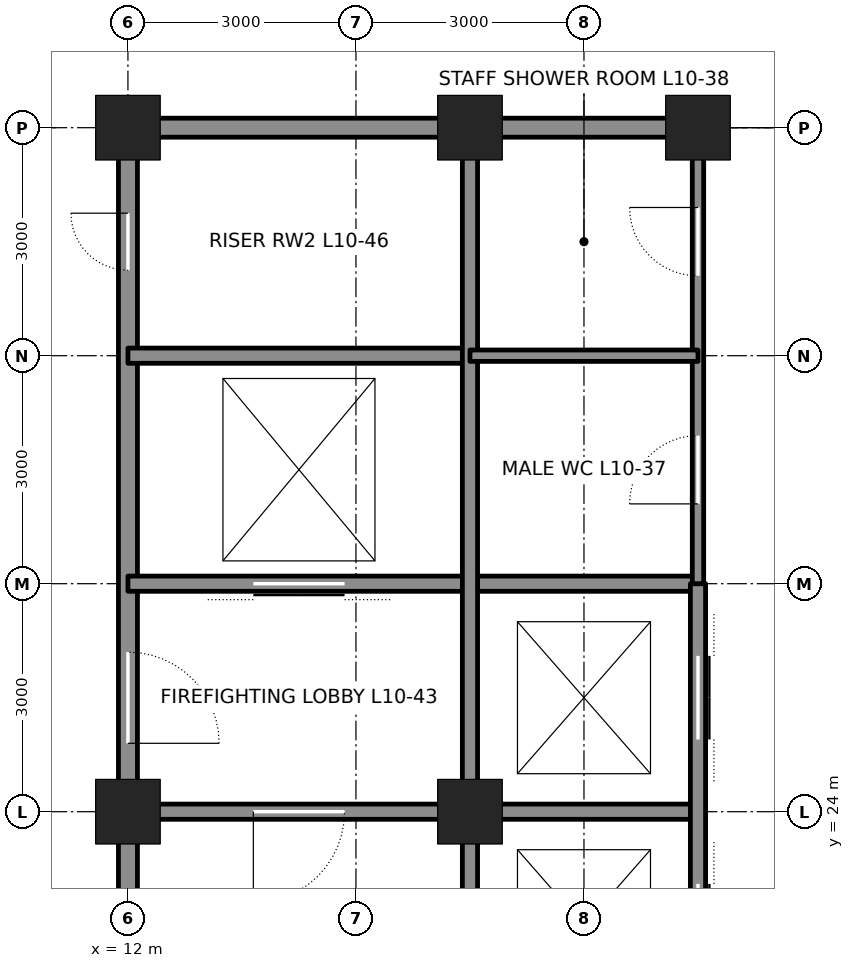
"""IFC4 building model, lengths in metres.
Left out: names, types, materials, properties, quantities, classifications, styles, units other than length and angle.
Written with IfcOpenShell. Run it as: python <this file> out.ifc"""

import sys

from ifc_helpers import new_model, si_unit, direction, frame, frame_2d, origin, origin_2d, place, context, subcontext, project, spatial, rectangle, hollow_rectangle, extrude, element, fill, save


model = new_model("IFC4")
c1 = context("Model", 3, precision=1e-05, world=origin(), true_north=direction((0.0, 1.0)))
c2 = subcontext(c1, "Body", "Model", "MODEL_VIEW")
j1 = project(units=[si_unit("LENGTHUNIT", "METRE"), si_unit("PLANEANGLEUNIT", "RADIAN")], contexts=[c1])
p1 = place(None, origin())
s1 = spatial("IfcSite", under=j1, at=p1, CompositionType="ELEMENT")
p2 = place(p1, origin())
s2 = spatial("IfcBuilding", under=s1, at=p2, CompositionType="ELEMENT")
p3 = place(p2, frame((0.0, 0.0, 51.3)))
s3 = spatial("IfcBuildingStorey", under=s2, at=p3, CompositionType="ELEMENT", Elevation=51.3)
for number, where, z_axis, x_axis in (
    (1, (12.0, 33.0, 0.0), (0.0, 0.0, 1.0), (1.0, 0.0, 0.0)),
    (2, (16.5, 33.0, 0.0), (0.0, 0.0, 1.0), (1.0, 0.0, 0.0)),
    (3, (19.5, 33.0, 0.0), (0.0, 0.0, 1.0), (1.0, 0.0, 0.0)),
    (4, (12.0, 24.0, 0.0), (0.0, 0.0, 1.0), (1.0, 0.0, 0.0)),
    (5, (16.5, 24.0, 0.0), (0.0, 0.0, 1.0), (1.0, 0.0, 0.0)),
):
    element("IfcColumn", number, at=place(p3, frame(where, z_axis=z_axis, x_axis=x_axis)), inside=s3, PredefinedType="COLUMN", context=c2, shape_type="SweptSolid", body=[
        extrude(hollow_rectangle(XDim=0.85, YDim=0.85, WallThickness=0.085, at=origin_2d()), origin(), (0.0, 0.0, 1.0), 4.5),
    ])
p4 = place(p3, frame((12.0, 21.25, 0.0), z_axis=(0.0, 0.0, 1.0), x_axis=(0.0, 1.0, 0.0)))
e6 = element("IfcWall", 6, at=p4, inside=s3, PredefinedType="SOLIDWALL", context=c2, shape_type="SweptSolid", body=[
    extrude(rectangle(XDim=2.5, YDim=0.25, at=frame_2d((1.25, 0.0))), origin(), (0.0, 0.0, 1.0), 3.113),
])
p5 = place(p3, frame((12.0, 24.25, 0.0), z_axis=(0.0, 0.0, 1.0), x_axis=(0.0, 1.0, 0.0)))
e7 = element("IfcWall", 7, at=p5, inside=s3, PredefinedType="SOLIDWALL", context=c2, shape_type="SweptSolid", body=[
    extrude(rectangle(XDim=8.5, YDim=0.25, at=frame_2d((4.25, 0.0))), origin(), (0.0, 0.0, 1.0), 3.113),
])
p6 = place(p5, frame((0.65, 0.0, 0.0)))
e8 = element("IfcOpeningElement", 8, at=p6, cuts=e7, PredefinedType="OPENING", context=c2, shape_type="SweptSolid", body=[
    extrude(rectangle(XDim=1.2, YDim=2.1, at=frame_2d((0.6, 1.05))), frame((0.0, 0.135, 0.0), z_axis=(0.0, -1.0, 0.0), x_axis=(1.0, 0.0, 0.0)), (0.0, 0.0, 1.0), 0.27),
])
p7 = place(p5, frame((6.875, 0.0, 0.0)))
e9 = element("IfcOpeningElement", 9, at=p7, cuts=e7, PredefinedType="OPENING", context=c2, shape_type="SweptSolid", body=[
    extrude(rectangle(XDim=0.75, YDim=2.1, at=frame_2d((0.375, 1.05))), frame((0.0, 0.135, 0.0), z_axis=(0.0, -1.0, 0.0), x_axis=(1.0, 0.0, 0.0)), (0.0, 0.0, 1.0), 0.27),
])
p8 = place(p3, frame((12.25, 24.0, 0.0), z_axis=(0.0, 0.0, 1.0), x_axis=(1.0, 0.0, 0.0)))
e10 = element("IfcWall", 10, at=p8, inside=s3, PredefinedType="SOLIDWALL", context=c2, shape_type="SweptSolid", body=[
    extrude(rectangle(XDim=4.0, YDim=0.2, at=frame_2d((2.0, 0.0))), origin(), (0.0, 0.0, 1.0), 3.39),
])
p9 = place(p8, frame((1.4, 0.0, 0.0)))
e11 = element("IfcOpeningElement", 11, at=p9, cuts=e10, PredefinedType="OPENING", context=c2, shape_type="SweptSolid", body=[
    extrude(rectangle(XDim=1.2, YDim=2.1, at=frame_2d((0.6, 1.05))), frame((0.0, 0.11, 0.0), z_axis=(0.0, -1.0, 0.0), x_axis=(1.0, 0.0, 0.0)), (0.0, 0.0, 1.0), 0.22),
])
p10 = place(p3, frame((16.75, 24.0, 0.0), z_axis=(0.0, 0.0, 1.0), x_axis=(1.0, 0.0, 0.0)))
e12 = element("IfcWall", 12, at=p10, inside=s3, PredefinedType="SOLIDWALL", context=c2, shape_type="SweptSolid", body=[
    extrude(rectangle(XDim=2.75, YDim=0.2, at=frame_2d((1.375, 0.0))), origin(), (0.0, 0.0, 1.0), 3.39),
])
p11 = place(p3, frame((12.0, 27.0, 0.0), z_axis=(0.0, 0.0, 1.0), x_axis=(1.0, 0.0, 0.0)))
e13 = element("IfcWall", 13, at=p11, inside=s3, PredefinedType="SOLIDWALL", context=c2, shape_type="SweptSolid", body=[
    extrude(rectangle(XDim=7.5, YDim=0.2, at=frame_2d((3.75, 0.0))), origin(), (0.0, 0.0, 1.0), 4.34),
])
p12 = place(p11, frame((1.65, 0.0, 0.0)))
e14 = element("IfcOpeningElement", 14, at=p12, cuts=e13, PredefinedType="OPENING", context=c2, shape_type="SweptSolid", body=[
    extrude(rectangle(XDim=1.2, YDim=2.1, at=frame_2d((0.6, 1.05))), frame((0.0, 0.11, 0.0), z_axis=(0.0, -1.0, 0.0), x_axis=(1.0, 0.0, 0.0)), (0.0, 0.0, 1.0), 0.22),
])
p13 = place(p3, frame((12.0, 30.0, 0.0), z_axis=(0.0, 0.0, 1.0), x_axis=(1.0, 0.0, 0.0)))
e15 = element("IfcWall", 15, at=p13, inside=s3, PredefinedType="SOLIDWALL", context=c2, shape_type="SweptSolid", body=[
    extrude(rectangle(XDim=4.5, YDim=0.2, at=frame_2d((2.25, 0.0))), origin(), (0.0, 0.0, 1.0), 4.34),
])
p14 = place(p3, frame((12.25, 33.0, 0.0), z_axis=(0.0, 0.0, 1.0), x_axis=(1.0, 0.0, 0.0)))
e16 = element("IfcWall", 16, at=p14, inside=s3, PredefinedType="SOLIDWALL", context=c2, shape_type="SweptSolid", body=[
    extrude(rectangle(XDim=4.0, YDim=0.25, at=frame_2d((2.0, 0.0))), origin(), (0.0, 0.0, 1.0), 3.181),
])
p15 = place(p3, frame((16.75, 33.0, 0.0), z_axis=(0.0, 0.0, 1.0), x_axis=(1.0, 0.0, 0.0)))
e17 = element("IfcWall", 17, at=p15, inside=s3, PredefinedType="SOLIDWALL", context=c2, shape_type="SweptSolid", body=[
    extrude(rectangle(XDim=2.5, YDim=0.25, at=frame_2d((1.25, 0.0))), origin(), (0.0, 0.0, 1.0), 3.181),
])
p16 = place(p3, frame((16.5, 21.25, 0.0), z_axis=(0.0, 0.0, 1.0), x_axis=(0.0, 1.0, 0.0)))
e18 = element("IfcWall", 18, at=p16, inside=s3, PredefinedType="SOLIDWALL", context=c2, shape_type="SweptSolid", body=[
    extrude(rectangle(XDim=2.5, YDim=0.2, at=frame_2d((1.25, 0.0))), origin(), (0.0, 0.0, 1.0), 3.413),
])
p17 = place(p3, frame((16.5, 24.25, 0.0), z_axis=(0.0, 0.0, 1.0), x_axis=(0.0, 1.0, 0.0)))
e19 = element("IfcWall", 19, at=p17, inside=s3, PredefinedType="SOLIDWALL", context=c2, shape_type="SweptSolid", body=[
    extrude(rectangle(XDim=8.5, YDim=0.2, at=frame_2d((4.25, 0.0))), origin(), (0.0, 0.0, 1.0), 3.413),
])
p18 = place(p3, frame((19.5, 15.0, 0.0), z_axis=(0.0, 0.0, 1.0), x_axis=(0.0, 1.0, 0.0)))
e20 = element("IfcWall", 20, at=p18, inside=s3, PredefinedType="SOLIDWALL", context=c2, shape_type="SweptSolid", body=[
    extrude(rectangle(XDim=12.0, YDim=0.2, at=frame_2d((6.0, 0.0))), origin(), (0.0, 0.0, 1.0), 3.365),
])
p19 = place(p18, frame((0.95, 0.0, 0.0)))
e21 = element("IfcOpeningElement", 21, at=p19, cuts=e20, PredefinedType="OPENING", context=c2, shape_type="SweptSolid", body=[
    extrude(rectangle(XDim=1.1, YDim=2.1, at=frame_2d((0.55, 1.05))), frame((0.0, 0.11, 0.0), z_axis=(0.0, -1.0, 0.0), x_axis=(1.0, 0.0, 0.0)), (0.0, 0.0, 1.0), 0.22),
])
p20 = place(p18, frame((3.95, 0.0, 0.0)))
e22 = element("IfcOpeningElement", 22, at=p20, cuts=e20, PredefinedType="OPENING", context=c2, shape_type="SweptSolid", body=[
    extrude(rectangle(XDim=1.1, YDim=2.1, at=frame_2d((0.55, 1.05))), frame((0.0, 0.11, 0.0), z_axis=(0.0, -1.0, 0.0), x_axis=(1.0, 0.0, 0.0)), (0.0, 0.0, 1.0), 0.22),
])
p21 = place(p18, frame((6.95, 0.0, 0.0)))
e23 = element("IfcOpeningElement", 23, at=p21, cuts=e20, PredefinedType="OPENING", context=c2, shape_type="SweptSolid", body=[
    extrude(rectangle(XDim=1.1, YDim=2.1, at=frame_2d((0.55, 1.05))), frame((0.0, 0.11, 0.0), z_axis=(0.0, -1.0, 0.0), x_axis=(1.0, 0.0, 0.0)), (0.0, 0.0, 1.0), 0.22),
])
p22 = place(p18, frame((9.95, 0.0, 0.0)))
e24 = element("IfcOpeningElement", 24, at=p22, cuts=e20, PredefinedType="OPENING", context=c2, shape_type="SweptSolid", body=[
    extrude(rectangle(XDim=1.1, YDim=2.1, at=frame_2d((0.55, 1.05))), frame((0.0, 0.11, 0.0), z_axis=(0.0, -1.0, 0.0), x_axis=(1.0, 0.0, 0.0)), (0.0, 0.0, 1.0), 0.22),
])
p23 = place(p3, frame((19.5, 27.0, 0.0), z_axis=(0.0, 0.0, 1.0), x_axis=(0.0, 1.0, 0.0)))
e25 = element("IfcWall", 25, at=p23, inside=s3, PredefinedType="PARTITIONING", context=c2, shape_type="SweptSolid", body=[
    extrude(rectangle(XDim=5.75, YDim=0.15, at=frame_2d((2.875, 0.0))), origin(), (0.0, 0.0, 1.0), 3.365),
])
p24 = place(p23, frame((1.05, 0.0, 0.0)))
e26 = element("IfcOpeningElement", 26, at=p24, cuts=e25, PredefinedType="OPENING", context=c2, shape_type="SweptSolid", body=[
    extrude(rectangle(XDim=0.9, YDim=2.1, at=frame_2d((0.45, 1.05))), frame((0.0, 0.085, 0.0), z_axis=(0.0, -1.0, 0.0), x_axis=(1.0, 0.0, 0.0)), (0.0, 0.0, 1.0), 0.17),
])
p25 = place(p23, frame((4.05, 0.0, 0.0)))
e27 = element("IfcOpeningElement", 27, at=p25, cuts=e25, PredefinedType="OPENING", context=c2, shape_type="SweptSolid", body=[
    extrude(rectangle(XDim=0.9, YDim=2.1, at=frame_2d((0.45, 1.05))), frame((0.0, 0.085, 0.0), z_axis=(0.0, -1.0, 0.0), x_axis=(1.0, 0.0, 0.0)), (0.0, 0.0, 1.0), 0.17),
])
p26 = place(p3, frame((16.5, 30.0, 0.0), z_axis=(0.0, 0.0, 1.0), x_axis=(1.0, 0.0, 0.0)))
e28 = element("IfcWall", 28, at=p26, inside=s3, PredefinedType="PARTITIONING", context=c2, shape_type="SweptSolid", body=[
    extrude(rectangle(XDim=3.0, YDim=0.15, at=frame_2d((1.5, 0.0))), origin(), (0.0, 0.0, 1.0), 4.34),
])
p27 = place(p9, frame((1.2, 0.0, 0.0), z_axis=(0.0, 0.0, 1.0), x_axis=(-1.0, 0.0, 0.0)))
e29 = element("IfcDoor", 29, at=p27, inside=s3, OperationType="SINGLE_SWING_RIGHT", PredefinedType="DOOR", context=c2, shape_type="SweptSolid", body=[
    extrude(rectangle(XDim=1.2, YDim=2.1, at=frame_2d((0.6, 1.05))), frame((0.0, 0.025, 0.0), z_axis=(0.0, -1.0, 0.0), x_axis=(1.0, 0.0, 0.0)), (0.0, 0.0, 1.0), 0.05),
])
fill(e11, e29)
p28 = place(p6, frame((1.2, 0.0, 0.0), z_axis=(0.0, 0.0, 1.0), x_axis=(-1.0, 0.0, 0.0)))
e30 = element("IfcDoor", 30, at=p28, inside=s3, OperationType="SINGLE_SWING_RIGHT", PredefinedType="DOOR", context=c2, shape_type="SweptSolid", body=[
    extrude(rectangle(XDim=1.2, YDim=2.1, at=frame_2d((0.6, 1.05))), frame((0.0, 0.025, 0.0), z_axis=(0.0, -1.0, 0.0), x_axis=(1.0, 0.0, 0.0)), (0.0, 0.0, 1.0), 0.05),
])
fill(e8, e30)
p29 = place(p12, origin())
e31 = element("IfcDoor", 31, at=p29, inside=s3, OperationType="DOUBLE_DOOR_SLIDING", PredefinedType="DOOR", context=c2, shape_type="SweptSolid", body=[
    extrude(rectangle(XDim=1.2, YDim=2.1, at=frame_2d((0.6, 1.05))), frame((0.0, 0.025, 0.0), z_axis=(0.0, -1.0, 0.0), x_axis=(1.0, 0.0, 0.0)), (0.0, 0.0, 1.0), 0.05),
])
fill(e14, e31)
p30 = place(p7, origin())
e32 = element("IfcDoor", 32, at=p30, inside=s3, OperationType="SINGLE_SWING_RIGHT", PredefinedType="DOOR", context=c2, shape_type="SweptSolid", body=[
    extrude(rectangle(XDim=0.75, YDim=2.1, at=frame_2d((0.375, 1.05))), frame((0.0, 0.025, 0.0), z_axis=(0.0, -1.0, 0.0), x_axis=(1.0, 0.0, 0.0)), (0.0, 0.0, 1.0), 0.05),
])
fill(e9, e32)
p31 = place(p24, origin())
e33 = element("IfcDoor", 33, at=p31, inside=s3, OperationType="SINGLE_SWING_LEFT", PredefinedType="DOOR", context=c2, shape_type="SweptSolid", body=[
    extrude(rectangle(XDim=0.9, YDim=2.1, at=frame_2d((0.45, 1.05))), frame((0.0, 0.025, 0.0), z_axis=(0.0, -1.0, 0.0), x_axis=(1.0, 0.0, 0.0)), (0.0, 0.0, 1.0), 0.05),
])
fill(e26, e33)
p32 = place(p25, origin())
e34 = element("IfcDoor", 34, at=p32, inside=s3, OperationType="SINGLE_SWING_RIGHT", PredefinedType="DOOR", context=c2, shape_type="SweptSolid", body=[
    extrude(rectangle(XDim=0.9, YDim=2.1, at=frame_2d((0.45, 1.05))), frame((0.0, 0.025, 0.0), z_axis=(0.0, -1.0, 0.0), x_axis=(1.0, 0.0, 0.0)), (0.0, 0.0, 1.0), 0.05),
])
fill(e27, e34)
p33 = place(p21, origin())
e35 = element("IfcDoor", 35, at=p33, inside=s3, OperationType="DOUBLE_DOOR_SLIDING", PredefinedType="DOOR", context=c2, shape_type="SweptSolid", body=[
    extrude(rectangle(XDim=1.1, YDim=2.1, at=frame_2d((0.55, 1.05))), frame((0.0, 0.025, 0.0), z_axis=(0.0, -1.0, 0.0), x_axis=(1.0, 0.0, 0.0)), (0.0, 0.0, 1.0), 0.05),
])
fill(e23, e35)
p34 = place(p22, origin())
e36 = element("IfcDoor", 36, at=p34, inside=s3, OperationType="DOUBLE_DOOR_SLIDING", PredefinedType="DOOR", context=c2, shape_type="SweptSolid", body=[
    extrude(rectangle(XDim=1.1, YDim=2.1, at=frame_2d((0.55, 1.05))), frame((0.0, 0.025, 0.0), z_axis=(0.0, -1.0, 0.0), x_axis=(1.0, 0.0, 0.0)), (0.0, 0.0, 1.0), 0.05),
])
fill(e24, e36)
save(model, sys.argv[1])
